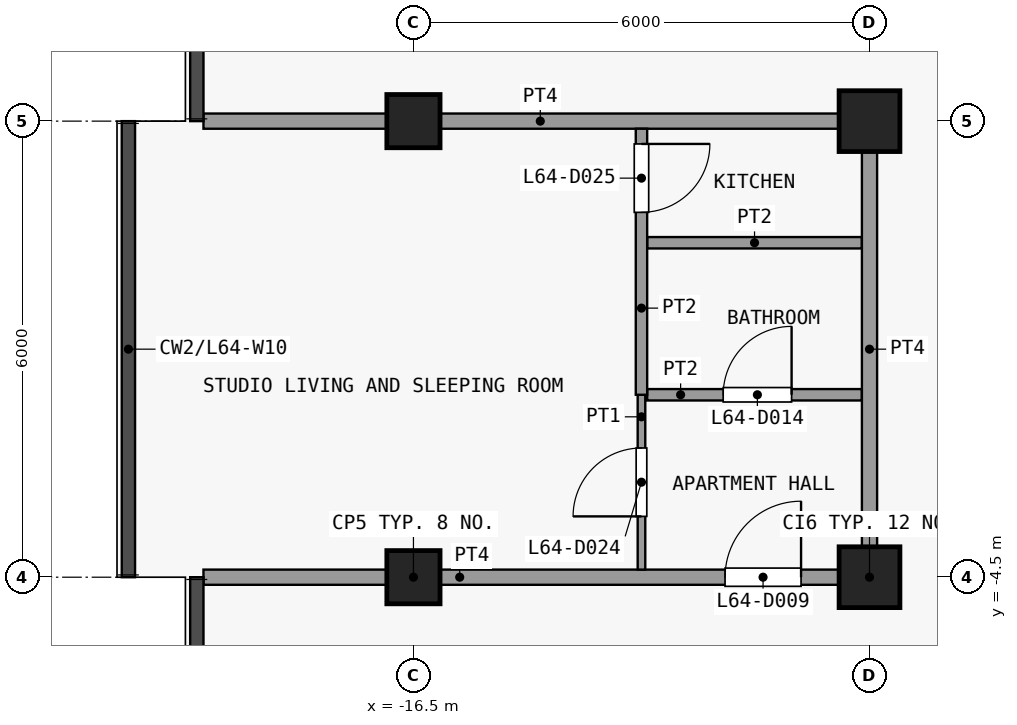
"""IFC4 building model, lengths in metres.
Left out: names, types, materials, properties, quantities, classifications, styles, units other than length and angle.
Written with IfcOpenShell. Run it as: python <this file> out.ifc"""

import sys

from ifc_helpers import new_model, si_unit, direction, frame, frame_2d, origin, origin_2d, place, context, subcontext, project, spatial, rectangle, extrude, element, fill, save


model = new_model("IFC4")
c1 = context("Model", 3, precision=1e-05, world=origin(), true_north=direction((0.0, 1.0)))
c2 = subcontext(c1, "Body", "Model", "MODEL_VIEW")
j1 = project(units=[si_unit("LENGTHUNIT", "METRE"), si_unit("PLANEANGLEUNIT", "RADIAN")], contexts=[c1])
p1 = place(None, origin())
s1 = spatial("IfcSite", under=j1, at=p1, CompositionType="ELEMENT")
p2 = place(p1, origin())
s2 = spatial("IfcBuilding", under=s1, at=p2, CompositionType="ELEMENT")
p3 = place(p2, frame((0.0, 0.0, 255.5)))
s3 = spatial("IfcBuildingStorey", under=s2, at=p3, CompositionType="ELEMENT", Elevation=255.5)
for number, where, z_axis, x_axis in (
    (1, (-16.5, -4.5, 0.0), (0.0, 0.0, 1.0), (1.0, 0.0, 0.0)),
    (2, (-16.5, 1.5, 0.0), (0.0, 0.0, 1.0), (1.0, 0.0, 0.0)),
):
    element("IfcColumn", number, at=place(p3, frame(where, z_axis=z_axis, x_axis=x_axis)), inside=s3, PredefinedType="COLUMN", context=c2, shape_type="SweptSolid", body=[
        extrude(rectangle(XDim=0.7, YDim=0.7, at=origin_2d()), origin(), (0.0, 0.0, 1.0), 3.6),
    ])
for number, where, z_axis, x_axis in (
    (3, (-10.5, -4.5, 0.0), (0.0, 0.0, 1.0), (1.0, 0.0, 0.0)),
    (4, (-10.5, 1.5, 0.0), (0.0, 0.0, 1.0), (1.0, 0.0, 0.0)),
):
    element("IfcColumn", number, at=place(p3, frame(where, z_axis=z_axis, x_axis=x_axis)), inside=s3, PredefinedType="COLUMN", context=c2, shape_type="SweptSolid", body=[
        extrude(rectangle(XDim=0.8, YDim=0.8, at=origin_2d()), origin(), (0.0, 0.0, 1.0), 3.6),
    ])
p4 = place(p3, frame((-19.262, -4.5, 0.0), z_axis=(0.0, 0.0, 1.0), x_axis=(1.0, 0.0, 0.0)))
e5 = element("IfcWall", 5, at=p4, inside=s3, PredefinedType="PARTITIONING", context=c2, shape_type="SweptSolid", body=[
    extrude(rectangle(XDim=8.863, YDim=0.2, at=frame_2d((4.431, 0.0))), origin(), (0.0, 0.0, 1.0), 3.3),
])
p5 = place(p4, frame((6.862, 0.0, 0.0)))
e6 = element("IfcOpeningElement", 6, at=p5, cuts=e5, PredefinedType="OPENING", context=c2, shape_type="SweptSolid", body=[
    extrude(rectangle(XDim=1.0, YDim=2.1, at=frame_2d((0.5, 1.05))), frame((0.0, 0.11, 0.0), z_axis=(0.0, -1.0, 0.0), x_axis=(1.0, 0.0, 0.0)), (0.0, 0.0, 1.0), 0.22),
])
p6 = place(p3, frame((-13.425, -2.1, 0.0), z_axis=(0.0, 0.0, 1.0), x_axis=(1.0, 0.0, 0.0)))
e7 = element("IfcWall", 7, at=p6, inside=s3, PredefinedType="PARTITIONING", context=c2, shape_type="SweptSolid", body=[
    extrude(rectangle(XDim=2.825, YDim=0.15, at=frame_2d((1.413, 0.0))), origin(), (0.0, 0.0, 1.0), 3.3),
])
p7 = place(p6, frame((1.0, 0.0, 0.0)))
e8 = element("IfcOpeningElement", 8, at=p7, cuts=e7, PredefinedType="OPENING", context=c2, shape_type="SweptSolid", body=[
    extrude(rectangle(XDim=0.9, YDim=2.1, at=frame_2d((0.45, 1.05))), frame((0.0, 0.085, 0.0), z_axis=(0.0, -1.0, 0.0), x_axis=(1.0, 0.0, 0.0)), (0.0, 0.0, 1.0), 0.17),
])
p8 = place(p3, frame((-13.425, -0.1, 0.0), z_axis=(0.0, 0.0, 1.0), x_axis=(1.0, 0.0, 0.0)))
e9 = element("IfcWall", 9, at=p8, inside=s3, PredefinedType="PARTITIONING", context=c2, shape_type="SweptSolid", body=[
    extrude(rectangle(XDim=2.825, YDim=0.15, at=frame_2d((1.413, 0.0))), origin(), (0.0, 0.0, 1.0), 3.3),
])
p9 = place(p3, frame((-19.262, 1.5, 0.0), z_axis=(0.0, 0.0, 1.0), x_axis=(1.0, 0.0, 0.0)))
e10 = element("IfcWall", 10, at=p9, inside=s3, PredefinedType="PARTITIONING", context=c2, shape_type="SweptSolid", body=[
    extrude(rectangle(XDim=8.863, YDim=0.2, at=frame_2d((4.431, 0.0))), origin(), (0.0, 0.0, 1.0), 3.3),
])
p10 = place(p3, frame((-13.5, -4.4, 0.0), z_axis=(0.0, 0.0, 1.0), x_axis=(0.0, 1.0, 0.0)))
e11 = element("IfcWall", 11, at=p10, inside=s3, PredefinedType="PARTITIONING", context=c2, shape_type="SweptSolid", body=[
    extrude(rectangle(XDim=2.3, YDim=0.1, at=frame_2d((1.15, 0.0))), origin(), (0.0, 0.0, 1.0), 3.3),
])
p11 = place(p10, frame((0.7, 0.0, 0.0)))
e12 = element("IfcOpeningElement", 12, at=p11, cuts=e11, PredefinedType="OPENING", context=c2, shape_type="SweptSolid", body=[
    extrude(rectangle(XDim=0.9, YDim=2.1, at=frame_2d((0.45, 1.05))), frame((0.0, 0.06, 0.0), z_axis=(0.0, -1.0, 0.0), x_axis=(1.0, 0.0, 0.0)), (0.0, 0.0, 1.0), 0.12),
])
p12 = place(p3, frame((-13.5, -2.1, 0.0), z_axis=(0.0, 0.0, 1.0), x_axis=(0.0, 1.0, 0.0)))
e13 = element("IfcWall", 13, at=p12, inside=s3, PredefinedType="PARTITIONING", context=c2, shape_type="SweptSolid", body=[
    extrude(rectangle(XDim=3.5, YDim=0.15, at=frame_2d((1.75, 0.0))), origin(), (0.0, 0.0, 1.0), 3.3),
])
p13 = place(p12, frame((2.4, 0.0, 0.0)))
e14 = element("IfcOpeningElement", 14, at=p13, cuts=e13, PredefinedType="OPENING", context=c2, shape_type="SweptSolid", body=[
    extrude(rectangle(XDim=0.9, YDim=2.1, at=frame_2d((0.45, 1.05))), frame((0.0, 0.085, 0.0), z_axis=(0.0, -1.0, 0.0), x_axis=(1.0, 0.0, 0.0)), (0.0, 0.0, 1.0), 0.17),
])
p14 = place(p3, frame((-10.5, -4.4, 0.0), z_axis=(0.0, 0.0, 1.0), x_axis=(0.0, 1.0, 0.0)))
e15 = element("IfcWall", 15, at=p14, inside=s3, PredefinedType="PARTITIONING", context=c2, shape_type="SweptSolid", body=[
    extrude(rectangle(XDim=5.8, YDim=0.2, at=frame_2d((2.9, 0.0))), origin(), (0.0, 0.0, 1.0), 3.3),
])
p15 = place(p5, origin())
e16 = element("IfcDoor", 16, at=p15, inside=s3, OperationType="SINGLE_SWING_LEFT", PredefinedType="DOOR", context=c2, shape_type="SweptSolid", body=[
    extrude(rectangle(XDim=1.0, YDim=2.1, at=frame_2d((0.5, 1.05))), frame((0.0, 0.025, 0.0), z_axis=(0.0, -1.0, 0.0), x_axis=(1.0, 0.0, 0.0)), (0.0, 0.0, 1.0), 0.05),
])
fill(e6, e16)
p16 = place(p7, origin())
e17 = element("IfcDoor", 17, at=p16, inside=s3, OperationType="SINGLE_SWING_LEFT", PredefinedType="DOOR", context=c2, shape_type="SweptSolid", body=[
    extrude(rectangle(XDim=0.9, YDim=2.1, at=frame_2d((0.45, 1.05))), frame((0.0, 0.025, 0.0), z_axis=(0.0, -1.0, 0.0), x_axis=(1.0, 0.0, 0.0)), (0.0, 0.0, 1.0), 0.05),
])
fill(e8, e17)
p17 = place(p11, origin())
e18 = element("IfcDoor", 18, at=p17, inside=s3, OperationType="SINGLE_SWING_RIGHT", PredefinedType="DOOR", context=c2, shape_type="SweptSolid", body=[
    extrude(rectangle(XDim=0.9, YDim=2.1, at=frame_2d((0.45, 1.05))), frame((0.0, 0.025, 0.0), z_axis=(0.0, -1.0, 0.0), x_axis=(1.0, 0.0, 0.0)), (0.0, 0.0, 1.0), 0.05),
])
fill(e12, e18)
p18 = place(p13, origin())
e19 = element("IfcDoor", 19, at=p18, inside=s3, OperationType="SINGLE_SWING_RIGHT", PredefinedType="DOOR", context=c2, shape_type="SweptSolid", body=[
    extrude(rectangle(XDim=0.9, YDim=2.1, at=frame_2d((0.45, 1.05))), frame((0.0, 0.025, 0.0), z_axis=(0.0, -1.0, 0.0), x_axis=(1.0, 0.0, 0.0)), (0.0, 0.0, 1.0), 0.05),
])
fill(e14, e19)
save(model, sys.argv[1])
